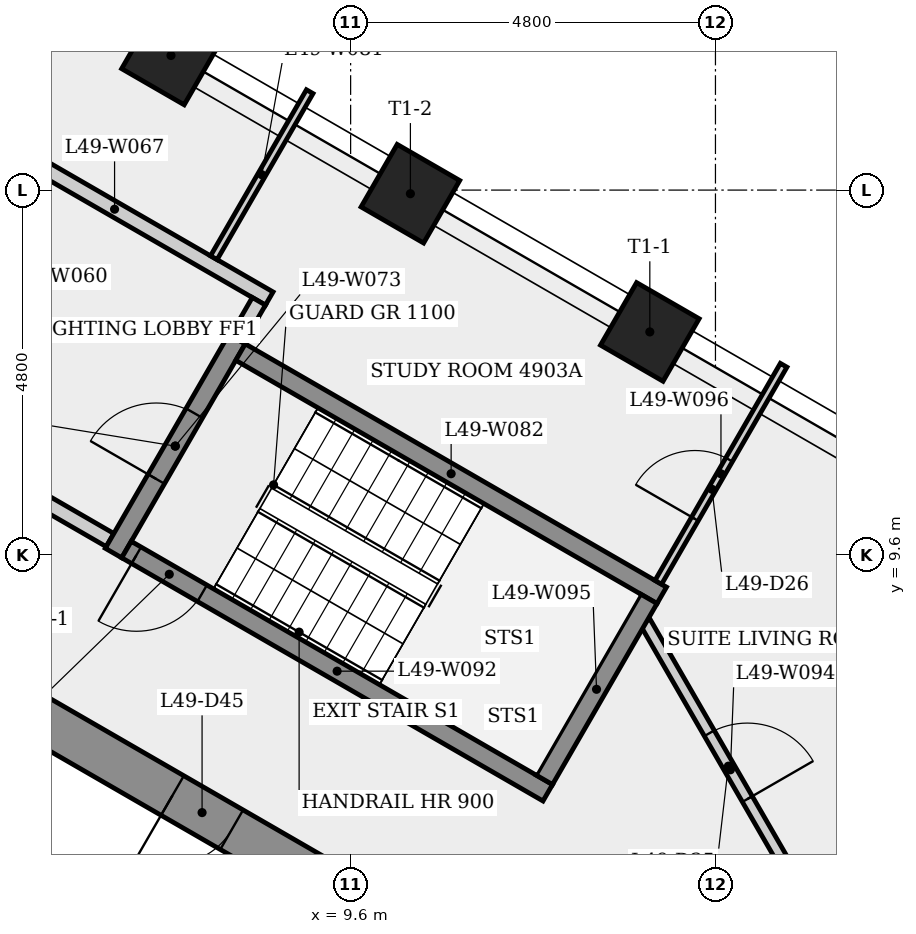
"""IFC4 building model, lengths in metres.
Left out: names, types, materials, properties, quantities, classifications, styles, units other than length and angle.
Written with IfcOpenShell. Run it as: python <this file> out.ifc"""

import sys

from ifc_helpers import new_model, si_unit, direction, frame, frame_2d, origin, origin_2d, place, context, subcontext, project, spatial, rectangle, extrude, element, fill, save


model = new_model("IFC4")
c1 = context("Model", 3, precision=1e-05, world=origin(), true_north=direction((0.0, 1.0)))
c2 = subcontext(c1, "Body", "Model", "MODEL_VIEW")
j1 = project(units=[si_unit("LENGTHUNIT", "METRE"), si_unit("PLANEANGLEUNIT", "RADIAN")], contexts=[c1])
p1 = place(None, origin())
s1 = spatial("IfcSite", under=j1, at=p1, CompositionType="ELEMENT")
p2 = place(p1, origin())
s2 = spatial("IfcBuilding", under=s1, at=p2, CompositionType="ELEMENT")
p3 = place(p2, frame((0.0, 0.0, 183.3)))
s3 = spatial("IfcBuildingStorey", under=s2, at=p3, CompositionType="ELEMENT", Elevation=183.3)
p4 = place(p3, frame((9.35, 5.225, 0.0), z_axis=(0.0, 0.0, 1.0), x_axis=(-0.866023993627, 0.500002442456, 0.0)))
e1 = element("IfcWall", 1, at=p4, inside=s3, PredefinedType="SHEAR", context=c2, shape_type="SweptSolid", body=[
    extrude(rectangle(XDim=10.97, YDim=0.6, at=frame_2d((5.485, 0.0))), origin(), (0.0, 0.0, 1.0), 3.4),
])
p5 = place(p4, frame((8.325, 0.0, 0.0)))
e2 = element("IfcOpeningElement", 2, at=p5, cuts=e1, PredefinedType="OPENING", context=c2, shape_type="SweptSolid", body=[
    extrude(rectangle(XDim=0.9, YDim=2.1, at=frame_2d((0.45, 1.05))), frame((0.0, 0.31, 0.0), z_axis=(0.0, -1.0, 0.0), x_axis=(1.0, 0.0, 0.0)), (0.0, 0.0, 1.0), 0.62),
])
p6 = place(p4, frame((1.518, 0.0, 0.0)))
e3 = element("IfcOpeningElement", 3, at=p6, cuts=e1, PredefinedType="OPENING", context=c2, shape_type="SweptSolid", body=[
    extrude(rectangle(XDim=0.9, YDim=2.1, at=frame_2d((0.45, 1.05))), frame((0.0, 0.31, 0.0), z_axis=(0.0, -1.0, 0.0), x_axis=(1.0, 0.0, 0.0)), (0.0, 0.0, 1.0), 0.62),
])
for number, where, z_axis, x_axis in (
    (4, (13.536, 12.534, 0.0), (0.0, 0.0, 1.0), (0.5, 0.866, 0.0)),
    (5, (10.386, 14.352, 0.0), (0.0, 0.0, 1.0), (0.5, 0.866, 0.0)),
    (6, (7.236, 16.171, 0.0), (0.0, 0.0, 1.0), (0.5, 0.866, 0.0)),
):
    element("IfcColumn", number, at=place(p3, frame(where, z_axis=z_axis, x_axis=x_axis)), inside=s3, PredefinedType="COLUMN", context=c2, shape_type="SweptSolid", body=[
        extrude(rectangle(XDim=0.95, YDim=0.95, at=origin_2d()), origin(), (0.0, 0.0, 1.0), 3.4),
    ])
p7 = place(p3, frame((4.459, 15.323, 0.0), z_axis=(0.0, 0.0, 1.0), x_axis=(0.866016039709, -0.500016218704, 0.0)))
e7 = element("IfcWall", 7, at=p7, inside=s3, PredefinedType="PARTITIONING", context=c2, shape_type="SweptSolid", body=[
    extrude(rectangle(XDim=4.7, YDim=0.2, at=frame_2d((2.35, 0.0))), origin(), (0.0, 0.0, 1.0), 3.0),
])
p8 = place(p3, frame((6.435, 9.795, 0.0), z_axis=(0.0, 0.0, 1.0), x_axis=(-0.866012907634, 0.500021643343, 0.0)))
e8 = element("IfcWall", 8, at=p8, inside=s3, PredefinedType="PARTITIONING", context=c2, shape_type="SweptSolid", body=[
    extrude(rectangle(XDim=4.45, YDim=0.2, at=frame_2d((2.225, 0.0))), origin(), (0.0, 0.0, 1.0), 3.0),
])
p9 = place(p8, frame((1.675, 0.0, 0.0)))
e9 = element("IfcOpeningElement", 9, at=p9, cuts=e8, PredefinedType="OPENING", context=c2, shape_type="SweptSolid", body=[
    extrude(rectangle(XDim=1.1, YDim=2.1, at=frame_2d((0.55, 1.05))), frame((0.0, 0.11, 0.0), z_axis=(0.0, -1.0, 0.0), x_axis=(1.0, 0.0, 0.0)), (0.0, 0.0, 1.0), 0.22),
])
p10 = place(p3, frame((6.48, 9.624, 0.0), z_axis=(0.0, 0.0, 1.0), x_axis=(0.500017246033, 0.866015446554, 0.0)))
e10 = element("IfcWall", 10, at=p10, inside=s3, PredefinedType="SHEAR", context=c2, shape_type="SweptSolid", body=[
    extrude(rectangle(XDim=3.25, YDim=0.25, at=frame_2d((1.625, 0.0))), origin(), (0.0, 0.0, 1.0), 3.0),
])
p11 = place(p10, frame((1.125, 0.0, 0.0)))
e11 = element("IfcOpeningElement", 11, at=p11, cuts=e10, PredefinedType="OPENING", context=c2, shape_type="SweptSolid", body=[
    extrude(rectangle(XDim=1.0, YDim=2.1, at=frame_2d((0.5, 1.05))), frame((0.0, 0.135, 0.0), z_axis=(0.0, -1.0, 0.0), x_axis=(1.0, 0.0, 0.0)), (0.0, 0.0, 1.0), 0.27),
])
p12 = place(p3, frame((7.8, 13.51, 0.0), z_axis=(0.0, 0.0, 1.0), x_axis=(0.50000999488, 0.866019633161, 0.0)))
e12 = element("IfcWall", 12, at=p12, inside=s3, PredefinedType="PARTITIONING", context=c2, shape_type="SweptSolid", body=[
    extrude(rectangle(XDim=2.523, YDim=0.1, at=frame_2d((1.262, 0.0))), origin(), (0.0, 0.0, 1.0), 3.0),
])
p13 = place(p3, frame((8.151, 12.268, 0.0), z_axis=(0.0, 0.0, 1.0), x_axis=(0.866025499775, -0.499999833739, 0.0)))
e13 = element("IfcWall", 13, at=p13, inside=s3, PredefinedType="SHEAR", context=c2, shape_type="SweptSolid", body=[
    extrude(rectangle(XDim=6.4, YDim=0.25, at=frame_2d((3.2, 0.0))), origin(), (0.0, 0.0, 1.0), 3.0),
])
p14 = place(p3, frame((8.393, 12.937, 0.0), z_axis=(0.0, 0.0, 1.0), x_axis=(-0.500065409566, -0.86598763626, 0.0)))
e14 = element("IfcWall", 14, at=p14, inside=s3, PredefinedType="PARTITIONING", context=c2, shape_type="SweptSolid", body=[
    extrude(rectangle(XDim=0.575, YDim=0.2, at=frame_2d((0.288, 0.0))), origin(), (0.0, 0.0, 1.0), 3.0),
])
p15 = place(p3, frame((12.194, 6.47, 0.0), z_axis=(0.0, 0.0, 1.0), x_axis=(-0.866025499775, 0.499999833739, 0.0)))
e15 = element("IfcWall", 15, at=p15, inside=s3, PredefinedType="SHEAR", context=c2, shape_type="SweptSolid", body=[
    extrude(rectangle(XDim=6.4, YDim=0.25, at=frame_2d((3.2, 0.0))), origin(), (0.0, 0.0, 1.0), 3.0),
])
p16 = place(p15, frame((5.25, 0.0, 0.0)))
e16 = element("IfcOpeningElement", 16, at=p16, cuts=e15, PredefinedType="OPENING", context=c2, shape_type="SweptSolid", body=[
    extrude(rectangle(XDim=1.0, YDim=2.1, at=frame_2d((0.5, 1.05))), frame((0.0, 0.135, 0.0), z_axis=(0.0, -1.0, 0.0), x_axis=(1.0, 0.0, 0.0)), (0.0, 0.0, 1.0), 0.27),
])
p17 = place(p3, frame((13.473, 8.719, 0.0), z_axis=(0.0, 0.0, 1.0), x_axis=(0.499976292358, -0.866039090965, 0.0)))
e17 = element("IfcWall", 17, at=p17, inside=s3, PredefinedType="PARTITIONING", context=c2, shape_type="SweptSolid", body=[
    extrude(rectangle(XDim=4.496, YDim=0.15, at=frame_2d((2.248, 0.0))), origin(), (0.0, 0.0, 1.0), 3.0),
])
p18 = place(p17, frame((1.693, 0.0, 0.0)))
e18 = element("IfcOpeningElement", 18, at=p18, cuts=e17, PredefinedType="OPENING", context=c2, shape_type="SweptSolid", body=[
    extrude(rectangle(XDim=1.0, YDim=2.1, at=frame_2d((0.5, 1.05))), frame((0.0, 0.085, 0.0), z_axis=(0.0, -1.0, 0.0), x_axis=(1.0, 0.0, 0.0)), (0.0, 0.0, 1.0), 0.17),
])
p19 = place(p3, frame((12.148, 6.641, 0.0), z_axis=(0.0, 0.0, 1.0), x_axis=(0.500034990121, 0.866005201286, 0.0)))
e19 = element("IfcWall", 19, at=p19, inside=s3, PredefinedType="SHEAR", context=c2, shape_type="SweptSolid", body=[
    extrude(rectangle(XDim=2.75, YDim=0.25, at=frame_2d((1.375, 0.0))), origin(), (0.0, 0.0, 1.0), 3.0),
])
p20 = place(p3, frame((13.648, 9.239, 0.0), z_axis=(0.0, 0.0, 1.0), x_axis=(0.500055614084, 0.865993292597, 0.0)))
e20 = element("IfcWall", 20, at=p20, inside=s3, PredefinedType="PARTITIONING", context=c2, shape_type="SweptSolid", body=[
    extrude(rectangle(XDim=3.298, YDim=0.1, at=frame_2d((1.649, 0.0))), origin(), (0.0, 0.0, 1.0), 3.0),
])
p21 = place(p20, frame((0.964, 0.0, 0.0)))
e21 = element("IfcOpeningElement", 21, at=p21, cuts=e20, PredefinedType="OPENING", context=c2, shape_type="SweptSolid", body=[
    extrude(rectangle(XDim=0.9, YDim=2.1, at=frame_2d((0.45, 1.05))), frame((0.0, 0.06, 0.0), z_axis=(0.0, -1.0, 0.0), x_axis=(1.0, 0.0, 0.0)), (0.0, 0.0, 1.0), 0.12),
])
p22 = place(p16, origin())
e22 = element("IfcDoor", 22, at=p22, inside=s3, OperationType="SINGLE_SWING_RIGHT", PredefinedType="DOOR", context=c2, shape_type="SweptSolid", body=[
    extrude(rectangle(XDim=1.0, YDim=2.1, at=frame_2d((0.5, 1.05))), frame((0.0, 0.025, 0.0), z_axis=(0.0, -1.0, 0.0), x_axis=(1.0, 0.0, 0.0)), (0.0, 0.0, 1.0), 0.05),
])
fill(e16, e22)
p23 = place(p11, origin())
e23 = element("IfcDoor", 23, at=p23, inside=s3, OperationType="SINGLE_SWING_LEFT", PredefinedType="DOOR", context=c2, shape_type="SweptSolid", body=[
    extrude(rectangle(XDim=1.0, YDim=2.1, at=frame_2d((0.5, 1.05))), frame((0.0, 0.025, 0.0), z_axis=(0.0, -1.0, 0.0), x_axis=(1.0, 0.0, 0.0)), (0.0, 0.0, 1.0), 0.05),
])
fill(e11, e23)
p24 = place(p18, origin())
e24 = element("IfcDoor", 24, at=p24, inside=s3, OperationType="SINGLE_SWING_RIGHT", PredefinedType="DOOR", context=c2, shape_type="SweptSolid", body=[
    extrude(rectangle(XDim=1.0, YDim=2.1, at=frame_2d((0.5, 1.05))), frame((0.0, 0.025, 0.0), z_axis=(0.0, -1.0, 0.0), x_axis=(1.0, 0.0, 0.0)), (0.0, 0.0, 1.0), 0.05),
])
fill(e18, e24)
p25 = place(p21, origin())
e25 = element("IfcDoor", 25, at=p25, inside=s3, OperationType="SINGLE_SWING_LEFT", PredefinedType="DOOR", context=c2, shape_type="SweptSolid", body=[
    extrude(rectangle(XDim=0.9, YDim=2.1, at=frame_2d((0.45, 1.05))), frame((0.0, 0.025, 0.0), z_axis=(0.0, -1.0, 0.0), x_axis=(1.0, 0.0, 0.0)), (0.0, 0.0, 1.0), 0.05),
])
fill(e21, e25)
p26 = place(p6, origin())
e26 = element("IfcDoor", 26, at=p26, inside=s3, OperationType="SINGLE_SWING_RIGHT", PredefinedType="DOOR", context=c2, shape_type="SweptSolid", body=[
    extrude(rectangle(XDim=0.9, YDim=2.1, at=frame_2d((0.45, 1.05))), frame((0.0, 0.025, 0.0), z_axis=(0.0, -1.0, 0.0), x_axis=(1.0, 0.0, 0.0)), (0.0, 0.0, 1.0), 0.05),
])
fill(e3, e26)
save(model, sys.argv[1])
